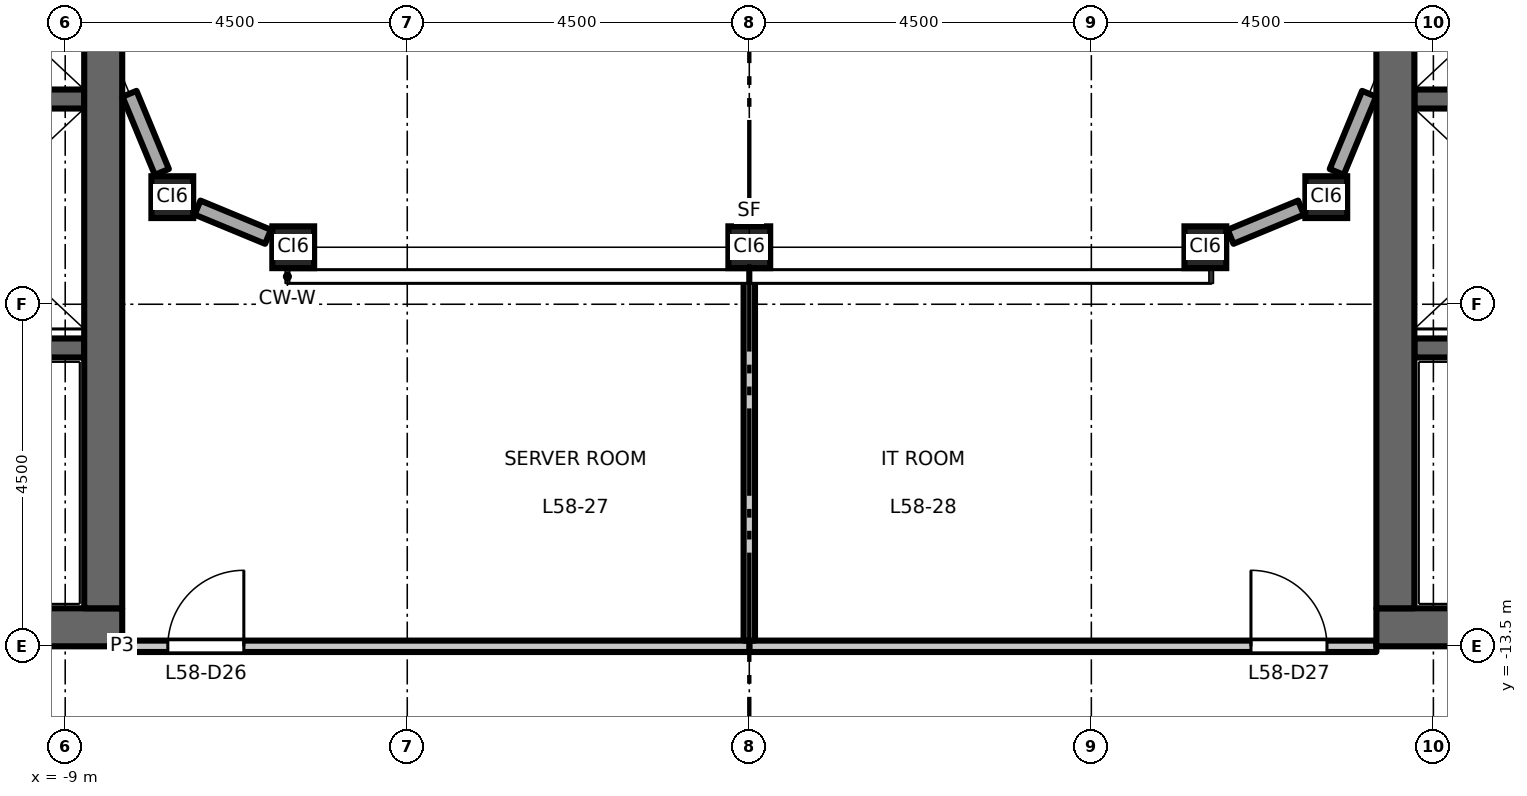
"""IFC4 building model, lengths in metres.
Left out: names, types, materials, properties, quantities, classifications, styles, units other than length and angle.
Written with IfcOpenShell. Run it as: python <this file> out.ifc"""

import sys

from ifc_helpers import new_model, si_unit, direction, frame, frame_2d, origin, origin_2d, place, context, subcontext, project, spatial, rectangle, hollow_rectangle, extrude, element, fill, save


model = new_model("IFC4")
c1 = context("Model", 3, precision=1e-05, world=origin(), true_north=direction((0.0, 1.0)))
c2 = subcontext(c1, "Body", "Model", "MODEL_VIEW")
j1 = project(units=[si_unit("LENGTHUNIT", "METRE"), si_unit("PLANEANGLEUNIT", "RADIAN")], contexts=[c1])
p1 = place(None, origin())
s1 = spatial("IfcSite", under=j1, at=p1, CompositionType="ELEMENT")
p2 = place(p1, origin())
s2 = spatial("IfcBuilding", under=s1, at=p2, CompositionType="ELEMENT")
p3 = place(p2, frame((0.0, 0.0, 269.2)))
s3 = spatial("IfcBuildingStorey", under=s2, at=p3, CompositionType="ELEMENT", Elevation=269.2)
for number, where, z_axis, x_axis in (
    (1, (-7.591, -7.591, 0.0), (0.0, 0.0, 1.0), (1.0, 0.0, 0.0)),
    (2, (-6.0, -8.25, 0.0), (0.0, 0.0, 1.0), (1.0, 0.0, 0.0)),
    (3, (0.0, -8.25, 0.0), (0.0, 0.0, 1.0), (1.0, 0.0, 0.0)),
    (4, (6.0, -8.25, 0.0), (0.0, 0.0, 1.0), (1.0, 0.0, 0.0)),
    (5, (7.591, -7.591, 0.0), (0.0, 0.0, 1.0), (1.0, 0.0, 0.0)),
):
    element("IfcColumn", number, at=place(p3, frame(where, z_axis=z_axis, x_axis=x_axis)), inside=s3, PredefinedType="COLUMN", context=c2, shape_type="SweptSolid", body=[
        extrude(hollow_rectangle(XDim=0.55, YDim=0.55, WallThickness=0.028, at=origin_2d()), origin(), (0.0, 0.0, 1.0), 4.5),
    ])
p4 = place(p3, frame((-8.75, -6.3, 0.0), z_axis=(0.0, 0.0, 1.0), x_axis=(-1.0, 0.0, 0.0)))
e6 = element("IfcWall", 6, at=p4, inside=s3, PredefinedType="SHEAR", context=c2, shape_type="SweptSolid", body=[
    extrude(rectangle(XDim=3.1, YDim=0.25, at=frame_2d((1.55, 0.0))), origin(), (0.0, 0.0, 1.0), 4.35),
])
p5 = place(p3, frame((-8.75, -9.575, 0.0), z_axis=(0.0, 0.0, 1.0), x_axis=(-1.0, 0.0, 0.0)))
e7 = element("IfcWall", 7, at=p5, inside=s3, PredefinedType="SHEAR", context=c2, shape_type="SweptSolid", body=[
    extrude(rectangle(XDim=8.0, YDim=0.25, at=frame_2d((4.0, 0.0))), origin(), (0.0, 0.0, 1.0), 4.35),
])
p6 = place(p5, frame((6.65, 0.0, 0.0)))
e8 = element("IfcOpeningElement", 8, at=p6, cuts=e7, PredefinedType="OPENING", context=c2, shape_type="SweptSolid", body=[
    extrude(rectangle(XDim=1.1, YDim=2.1, at=frame_2d((0.55, 1.05))), frame((0.0, 0.135, 0.0), z_axis=(0.0, -1.0, 0.0), x_axis=(1.0, 0.0, 0.0)), (0.0, 0.0, 1.0), 0.27),
])
p7 = place(p3, frame((-8.25, -13.25, 0.0), z_axis=(0.0, 0.0, 1.0), x_axis=(-1.0, 0.0, 0.0)))
e9 = element("IfcWall", 9, at=p7, inside=s3, PredefinedType="SHEAR", context=c2, shape_type="SweptSolid", body=[
    extrude(rectangle(XDim=13.5, YDim=0.5, at=frame_2d((6.75, 0.0))), origin(), (0.0, 0.0, 1.0), 4.35),
])
p8 = place(p3, frame((-8.5, -13.0, 0.0), z_axis=(0.0, 0.0, 1.0), x_axis=(0.0, 1.0, 0.0)))
e10 = element("IfcWall", 10, at=p8, inside=s3, PredefinedType="SHEAR", context=c2, shape_type="SweptSolid", body=[
    extrude(rectangle(XDim=26.0, YDim=0.5, at=frame_2d((13.0, 0.0))), origin(), (0.0, 0.0, 1.0), 4.35),
])
p9 = place(p3, frame((8.75, -6.3, 0.0), z_axis=(0.0, 0.0, 1.0), x_axis=(1.0, 0.0, 0.0)))
e11 = element("IfcWall", 11, at=p9, inside=s3, PredefinedType="SHEAR", context=c2, shape_type="SweptSolid", body=[
    extrude(rectangle(XDim=3.1, YDim=0.25, at=frame_2d((1.55, 0.0))), origin(), (0.0, 0.0, 1.0), 4.35),
])
p10 = place(p3, frame((8.75, -9.575, 0.0), z_axis=(0.0, 0.0, 1.0), x_axis=(1.0, 0.0, 0.0)))
e12 = element("IfcWall", 12, at=p10, inside=s3, PredefinedType="SHEAR", context=c2, shape_type="SweptSolid", body=[
    extrude(rectangle(XDim=8.0, YDim=0.25, at=frame_2d((4.0, 0.0))), origin(), (0.0, 0.0, 1.0), 4.35),
])
p11 = place(p10, frame((6.65, 0.0, 0.0)))
e13 = element("IfcOpeningElement", 13, at=p11, cuts=e12, PredefinedType="OPENING", context=c2, shape_type="SweptSolid", body=[
    extrude(rectangle(XDim=1.1, YDim=2.1, at=frame_2d((0.55, 1.05))), frame((0.0, 0.135, 0.0), z_axis=(0.0, -1.0, 0.0), x_axis=(1.0, 0.0, 0.0)), (0.0, 0.0, 1.0), 0.27),
])
p12 = place(p3, frame((8.25, -13.25, 0.0), z_axis=(0.0, 0.0, 1.0), x_axis=(1.0, 0.0, 0.0)))
e14 = element("IfcWall", 14, at=p12, inside=s3, PredefinedType="SHEAR", context=c2, shape_type="SweptSolid", body=[
    extrude(rectangle(XDim=13.5, YDim=0.5, at=frame_2d((6.75, 0.0))), origin(), (0.0, 0.0, 1.0), 4.35),
])
p13 = place(p3, frame((8.5, -13.0, 0.0), z_axis=(0.0, 0.0, 1.0), x_axis=(0.0, 1.0, 0.0)))
e15 = element("IfcWall", 15, at=p13, inside=s3, PredefinedType="SHEAR", context=c2, shape_type="SweptSolid", body=[
    extrude(rectangle(XDim=26.0, YDim=0.5, at=frame_2d((13.0, 0.0))), origin(), (0.0, 0.0, 1.0), 4.35),
])
p14 = place(p3, frame((6.332, -8.113, 0.0), z_axis=(0.0, 0.0, 1.0), x_axis=(0.923859650767, 0.382731427616, 0.0)))
e16 = element("IfcWall", 16, at=p14, inside=s3, PredefinedType="STANDARD", context=c2, shape_type="SweptSolid", body=[
    extrude(rectangle(XDim=1.003, YDim=0.2, at=frame_2d((0.502, 0.0))), origin(), (0.0, 0.0, 1.0), 3.918),
])
for number, where, z_axis, x_axis in (
    (17, (7.729, -7.259, 0.0), (0.0, 0.0, 1.0), (0.383, 0.924, 0.0)),
    (18, (-8.154, -6.231, 0.0), (0.0, 0.0, 1.0), (0.383, -0.924, 0.0)),
):
    element("IfcWall", number, at=place(p3, frame(where, z_axis=z_axis, x_axis=x_axis)), inside=s3, PredefinedType="STANDARD", context=c2, shape_type="SweptSolid", body=[
        extrude(rectangle(XDim=1.113, YDim=0.2, at=frame_2d((0.556, 0.0))), origin(), (0.0, 0.0, 1.0), 3.918),
    ])
p15 = place(p3, frame((-7.259, -7.729, 0.0), z_axis=(0.0, 0.0, 1.0), x_axis=(0.923859650767, -0.382731427616, 0.0)))
e19 = element("IfcWall", 19, at=p15, inside=s3, PredefinedType="STANDARD", context=c2, shape_type="SweptSolid", body=[
    extrude(rectangle(XDim=1.003, YDim=0.2, at=frame_2d((0.502, 0.0))), origin(), (0.0, 0.0, 1.0), 3.918),
])
p16 = place(p3, frame((0.0, -13.5, 0.0), z_axis=(0.0, 0.0, 1.0), x_axis=(1.0, 0.0, 0.0)))
e20 = element("IfcWall", 20, at=p16, inside=s3, PredefinedType="PARTITIONING", context=c2, shape_type="SweptSolid", body=[
    extrude(rectangle(XDim=8.25, YDim=0.15, at=frame_2d((4.125, 0.0))), origin(), (0.0, 0.0, 1.0), 3.95),
])
p17 = place(p16, frame((6.6, 0.0, 0.0)))
e21 = element("IfcOpeningElement", 21, at=p17, cuts=e20, PredefinedType="OPENING", context=c2, shape_type="SweptSolid", body=[
    extrude(rectangle(XDim=1.0, YDim=2.1, at=frame_2d((0.5, 1.05))), frame((0.0, 0.085, 0.0), z_axis=(0.0, -1.0, 0.0), x_axis=(1.0, 0.0, 0.0)), (0.0, 0.0, 1.0), 0.17),
])
p18 = place(p3, frame((-8.25, -13.5, 0.0), z_axis=(0.0, 0.0, 1.0), x_axis=(1.0, 0.0, 0.0)))
e22 = element("IfcWall", 22, at=p18, inside=s3, PredefinedType="PARTITIONING", context=c2, shape_type="SweptSolid", body=[
    extrude(rectangle(XDim=8.25, YDim=0.15, at=frame_2d((4.125, 0.0))), origin(), (0.0, 0.0, 1.0), 3.95),
])
p19 = place(p18, frame((0.6, 0.0, 0.0)))
e23 = element("IfcOpeningElement", 23, at=p19, cuts=e22, PredefinedType="OPENING", context=c2, shape_type="SweptSolid", body=[
    extrude(rectangle(XDim=1.0, YDim=2.1, at=frame_2d((0.5, 1.05))), frame((0.0, 0.085, 0.0), z_axis=(0.0, -1.0, 0.0), x_axis=(1.0, 0.0, 0.0)), (0.0, 0.0, 1.0), 0.17),
])
p20 = place(p3, frame((0.0, -13.425, 0.0), z_axis=(0.0, 0.0, 1.0), x_axis=(0.0, 1.0, 0.0)))
e24 = element("IfcWall", 24, at=p20, inside=s3, PredefinedType="PARTITIONING", context=c2, shape_type="SweptSolid", body=[
    extrude(rectangle(XDim=4.825, YDim=0.15, at=frame_2d((2.413, 0.0))), origin(), (0.0, 0.0, 1.0), 3.55),
])
p21 = place(p19, origin())
e25 = element("IfcDoor", 25, at=p21, inside=s3, OperationType="SINGLE_SWING_RIGHT", PredefinedType="DOOR", context=c2, shape_type="SweptSolid", body=[
    extrude(rectangle(XDim=1.0, YDim=2.1, at=frame_2d((0.5, 1.05))), frame((0.0, 0.025, 0.0), z_axis=(0.0, -1.0, 0.0), x_axis=(1.0, 0.0, 0.0)), (0.0, 0.0, 1.0), 0.05),
])
fill(e23, e25)
p22 = place(p17, origin())
e26 = element("IfcDoor", 26, at=p22, inside=s3, OperationType="SINGLE_SWING_LEFT", PredefinedType="DOOR", context=c2, shape_type="SweptSolid", body=[
    extrude(rectangle(XDim=1.0, YDim=2.1, at=frame_2d((0.5, 1.05))), frame((0.0, 0.025, 0.0), z_axis=(0.0, -1.0, 0.0), x_axis=(1.0, 0.0, 0.0)), (0.0, 0.0, 1.0), 0.05),
])
fill(e21, e26)
save(model, sys.argv[1])
